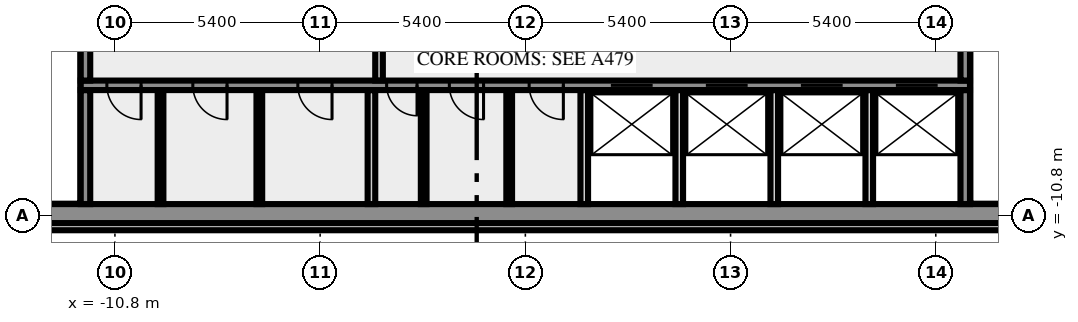
"""IFC4 building model, lengths in metres.
Left out: names, types, materials, properties, quantities, classifications, styles, units other than length and angle.
Written with IfcOpenShell. Run it as: python <this file> out.ifc"""

import sys

from ifc_helpers import new_model, si_unit, direction, frame, frame_2d, origin, place, context, subcontext, project, spatial, rectangle, extrude, element, fill, save


model = new_model("IFC4")
c1 = context("Model", 3, precision=1e-05, world=origin(), true_north=direction((0.0, 1.0)))
c2 = subcontext(c1, "Body", "Model", "MODEL_VIEW")
j1 = project(units=[si_unit("LENGTHUNIT", "METRE"), si_unit("PLANEANGLEUNIT", "RADIAN")], contexts=[c1])
p1 = place(None, origin())
s1 = spatial("IfcSite", under=j1, at=p1, CompositionType="ELEMENT")
p2 = place(p1, origin())
s2 = spatial("IfcBuilding", under=s1, at=p2, CompositionType="ELEMENT")
p3 = place(p2, frame((0.0, 0.0, 148.0)))
s3 = spatial("IfcBuildingStorey", under=s2, at=p3, CompositionType="ELEMENT", Elevation=148.0)
p4 = place(p3, frame((-17.444, -11.088, 0.0), z_axis=(0.0, 0.0, 1.0), x_axis=(1.0, 0.0, 0.0)))
e1 = element("IfcWall", 1, at=p4, inside=s3, PredefinedType="SOLIDWALL", context=c2, shape_type="SweptSolid", body=[
    extrude(rectangle(XDim=34.888, YDim=0.2, at=frame_2d((17.444, 0.0))), origin(), (0.0, 0.0, 1.0), 3.65),
])
p5 = place(p3, frame((-20.0, -10.75, 0.0), z_axis=(0.0, 0.0, 1.0), x_axis=(1.0, 0.0, 0.0)))
e2 = element("IfcWall", 2, at=p5, inside=s3, PredefinedType="SHEAR", context=c2, shape_type="SweptSolid", body=[
    extrude(rectangle(XDim=40.0, YDim=0.5, at=frame_2d((20.0, 0.0))), origin(), (0.0, 0.0, 1.0), 3.65),
])
p6 = place(p5, frame((0.8, 0.0, 1.0)))
e3 = element("IfcOpeningElement", 3, at=p6, cuts=e2, PredefinedType="OPENING", context=c2, shape_type="SweptSolid", body=[
    extrude(rectangle(XDim=1.2, YDim=1.2, at=frame_2d((0.6, 0.6))), frame((0.0, 0.26, 0.0), z_axis=(0.0, -1.0, 0.0), x_axis=(1.0, 0.0, 0.0)), (0.0, 0.0, 1.0), 0.52),
])
p7 = place(p5, frame((38.0, 0.0, 1.0)))
e4 = element("IfcOpeningElement", 4, at=p7, cuts=e2, PredefinedType="OPENING", context=c2, shape_type="SweptSolid", body=[
    extrude(rectangle(XDim=1.2, YDim=1.2, at=frame_2d((0.6, 0.6))), frame((0.0, 0.26, 0.0), z_axis=(0.0, -1.0, 0.0), x_axis=(1.0, 0.0, 0.0)), (0.0, 0.0, 1.0), 0.52),
])
p8 = place(p3, frame((-11.575, -10.5, 0.0), z_axis=(0.0, 0.0, 1.0), x_axis=(0.0, 1.0, 0.0)))
e5 = element("IfcWall", 5, at=p8, inside=s3, PredefinedType="SHEAR", context=c2, shape_type="SweptSolid", body=[
    extrude(rectangle(XDim=3.0, YDim=0.25, at=frame_2d((1.5, 0.0))), origin(), (0.0, 0.0, 1.0), 3.65),
])
for number, where, z_axis, x_axis in (
    (6, (-9.6, -10.5, 0.0), (0.0, 0.0, 1.0), (0.0, 1.0, 0.0)),
    (7, (-7.0, -10.5, 0.0), (0.0, 0.0, 1.0), (0.0, 1.0, 0.0)),
):
    element("IfcWall", number, at=place(p3, frame(where, z_axis=z_axis, x_axis=x_axis)), inside=s3, PredefinedType="PARTITIONING", context=c2, shape_type="SweptSolid", body=[
        extrude(rectangle(XDim=3.0, YDim=0.15, at=frame_2d((1.5, 0.0))), origin(), (0.0, 0.0, 1.0), 3.65),
    ])
p9 = place(p3, frame((-4.05, -10.5, 0.0), z_axis=(0.0, 0.0, 1.0), x_axis=(0.0, 1.0, 0.0)))
e8 = element("IfcWall", 8, at=p9, inside=s3, PredefinedType="SOLIDWALL", context=c2, shape_type="SweptSolid", body=[
    extrude(rectangle(XDim=3.0, YDim=0.2, at=frame_2d((1.5, 0.0))), origin(), (0.0, 0.0, 1.0), 3.65),
])
for number, where, z_axis, x_axis in (
    (9, (-2.675, -10.5, 0.0), (0.0, 0.0, 1.0), (0.0, 1.0, 0.0)),
    (10, (-0.425, -10.5, 0.0), (0.0, 0.0, 1.0), (0.0, 1.0, 0.0)),
):
    element("IfcWall", number, at=place(p3, frame(where, z_axis=z_axis, x_axis=x_axis)), inside=s3, PredefinedType="PARTITIONING", context=c2, shape_type="SweptSolid", body=[
        extrude(rectangle(XDim=3.0, YDim=0.15, at=frame_2d((1.5, 0.0))), origin(), (0.0, 0.0, 1.0), 3.65),
    ])
for number, where, z_axis, x_axis in (
    (11, (1.55, -10.5, 0.0), (0.0, 0.0, 1.0), (0.0, 1.0, 0.0)),
    (12, (4.05, -10.5, 0.0), (0.0, 0.0, 1.0), (0.0, 1.0, 0.0)),
    (13, (6.55, -10.5, 0.0), (0.0, 0.0, 1.0), (0.0, 1.0, 0.0)),
    (14, (9.05, -10.5, 0.0), (0.0, 0.0, 1.0), (0.0, 1.0, 0.0)),
):
    element("IfcWall", number, at=place(p3, frame(where, z_axis=z_axis, x_axis=x_axis)), inside=s3, PredefinedType="SOLIDWALL", context=c2, shape_type="SweptSolid", body=[
        extrude(rectangle(XDim=3.0, YDim=0.2, at=frame_2d((1.5, 0.0))), origin(), (0.0, 0.0, 1.0), 3.65),
    ])
p10 = place(p3, frame((11.575, -10.5, 0.0), z_axis=(0.0, 0.0, 1.0), x_axis=(0.0, 1.0, 0.0)))
e15 = element("IfcWall", 15, at=p10, inside=s3, PredefinedType="SHEAR", context=c2, shape_type="SweptSolid", body=[
    extrude(rectangle(XDim=3.0, YDim=0.25, at=frame_2d((1.5, 0.0))), origin(), (0.0, 0.0, 1.0), 3.65),
])
p11 = place(p3, frame((11.7, -7.375, 0.0), z_axis=(0.0, 0.0, 1.0), x_axis=(-1.0, 0.0, 0.0)))
e16 = element("IfcWall", 16, at=p11, inside=s3, PredefinedType="SHEAR", context=c2, shape_type="SweptSolid", body=[
    extrude(rectangle(XDim=23.4, YDim=0.25, at=frame_2d((11.7, 0.0))), origin(), (0.0, 0.0, 1.0), 3.65),
])
p12 = place(p11, frame((21.812, 0.0, 0.0)))
e17 = element("IfcOpeningElement", 17, at=p12, cuts=e16, PredefinedType="OPENING", context=c2, shape_type="SweptSolid", body=[
    extrude(rectangle(XDim=0.9, YDim=2.1, at=frame_2d((0.45, 1.05))), frame((0.0, 0.135, 0.0), z_axis=(0.0, -1.0, 0.0), x_axis=(1.0, 0.0, 0.0)), (0.0, 0.0, 1.0), 0.27),
])
p13 = place(p11, frame((19.55, 0.0, 0.0)))
e18 = element("IfcOpeningElement", 18, at=p13, cuts=e16, PredefinedType="OPENING", context=c2, shape_type="SweptSolid", body=[
    extrude(rectangle(XDim=0.9, YDim=2.1, at=frame_2d((0.45, 1.05))), frame((0.0, 0.135, 0.0), z_axis=(0.0, -1.0, 0.0), x_axis=(1.0, 0.0, 0.0)), (0.0, 0.0, 1.0), 0.27),
])
p14 = place(p11, frame((16.787, 0.0, 0.0)))
e19 = element("IfcOpeningElement", 19, at=p14, cuts=e16, PredefinedType="OPENING", context=c2, shape_type="SweptSolid", body=[
    extrude(rectangle(XDim=0.9, YDim=2.1, at=frame_2d((0.45, 1.05))), frame((0.0, 0.135, 0.0), z_axis=(0.0, -1.0, 0.0), x_axis=(1.0, 0.0, 0.0)), (0.0, 0.0, 1.0), 0.27),
])
p15 = place(p11, frame((14.55, 0.0, 0.0)))
e20 = element("IfcOpeningElement", 20, at=p15, cuts=e16, PredefinedType="OPENING", context=c2, shape_type="SweptSolid", body=[
    extrude(rectangle(XDim=0.8, YDim=2.1, at=frame_2d((0.4, 1.05))), frame((0.0, 0.135, 0.0), z_axis=(0.0, -1.0, 0.0), x_axis=(1.0, 0.0, 0.0)), (0.0, 0.0, 1.0), 0.27),
])
p16 = place(p11, frame((12.8, 0.0, 0.0)))
e21 = element("IfcOpeningElement", 21, at=p16, cuts=e16, PredefinedType="OPENING", context=c2, shape_type="SweptSolid", body=[
    extrude(rectangle(XDim=0.9, YDim=2.1, at=frame_2d((0.45, 1.05))), frame((0.0, 0.135, 0.0), z_axis=(0.0, -1.0, 0.0), x_axis=(1.0, 0.0, 0.0)), (0.0, 0.0, 1.0), 0.27),
])
p17 = place(p11, frame((10.7, 0.0, 0.0)))
e22 = element("IfcOpeningElement", 22, at=p17, cuts=e16, PredefinedType="OPENING", context=c2, shape_type="SweptSolid", body=[
    extrude(rectangle(XDim=0.9, YDim=2.1, at=frame_2d((0.45, 1.05))), frame((0.0, 0.135, 0.0), z_axis=(0.0, -1.0, 0.0), x_axis=(1.0, 0.0, 0.0)), (0.0, 0.0, 1.0), 0.27),
])
p18 = place(p11, frame((8.35, 0.0, 0.0)))
e23 = element("IfcOpeningElement", 23, at=p18, cuts=e16, PredefinedType="OPENING", context=c2, shape_type="SweptSolid", body=[
    extrude(rectangle(XDim=1.1, YDim=2.1, at=frame_2d((0.55, 1.05))), frame((0.0, 0.135, 0.0), z_axis=(0.0, -1.0, 0.0), x_axis=(1.0, 0.0, 0.0)), (0.0, 0.0, 1.0), 0.27),
])
p19 = place(p11, frame((5.85, 0.0, 0.0)))
e24 = element("IfcOpeningElement", 24, at=p19, cuts=e16, PredefinedType="OPENING", context=c2, shape_type="SweptSolid", body=[
    extrude(rectangle(XDim=1.1, YDim=2.1, at=frame_2d((0.55, 1.05))), frame((0.0, 0.135, 0.0), z_axis=(0.0, -1.0, 0.0), x_axis=(1.0, 0.0, 0.0)), (0.0, 0.0, 1.0), 0.27),
])
p20 = place(p11, frame((3.35, 0.0, 0.0)))
e25 = element("IfcOpeningElement", 25, at=p20, cuts=e16, PredefinedType="OPENING", context=c2, shape_type="SweptSolid", body=[
    extrude(rectangle(XDim=1.1, YDim=2.1, at=frame_2d((0.55, 1.05))), frame((0.0, 0.135, 0.0), z_axis=(0.0, -1.0, 0.0), x_axis=(1.0, 0.0, 0.0)), (0.0, 0.0, 1.0), 0.27),
])
p21 = place(p11, frame((0.85, 0.0, 0.0)))
e26 = element("IfcOpeningElement", 26, at=p21, cuts=e16, PredefinedType="OPENING", context=c2, shape_type="SweptSolid", body=[
    extrude(rectangle(XDim=1.1, YDim=2.1, at=frame_2d((0.55, 1.05))), frame((0.0, 0.135, 0.0), z_axis=(0.0, -1.0, 0.0), x_axis=(1.0, 0.0, 0.0)), (0.0, 0.0, 1.0), 0.27),
])
p22 = place(p3, frame((-11.575, -7.25, 0.0), z_axis=(0.0, 0.0, 1.0), x_axis=(0.0, 1.0, 0.0)))
e27 = element("IfcWall", 27, at=p22, inside=s3, PredefinedType="SHEAR", context=c2, shape_type="SweptSolid", body=[
    extrude(rectangle(XDim=1.0, YDim=0.25, at=frame_2d((0.5, 0.0))), origin(), (0.0, 0.0, 1.0), 3.65),
])
p23 = place(p3, frame((-3.85, -4.25, 0.0), z_axis=(0.0, 0.0, 1.0), x_axis=(0.0, -1.0, 0.0)))
e28 = element("IfcWall", 28, at=p23, inside=s3, PredefinedType="SOLIDWALL", context=c2, shape_type="SweptSolid", body=[
    extrude(rectangle(XDim=3.0, YDim=0.2, at=frame_2d((1.5, 0.0))), origin(), (0.0, 0.0, 1.0), 3.65),
])
p24 = place(p23, frame((0.8, 0.0, 0.0)))
e29 = element("IfcOpeningElement", 29, at=p24, cuts=e28, PredefinedType="OPENING", context=c2, shape_type="SweptSolid", body=[
    extrude(rectangle(XDim=1.4, YDim=2.1, at=frame_2d((0.7, 1.05))), frame((0.0, 0.11, 0.0), z_axis=(0.0, -1.0, 0.0), x_axis=(1.0, 0.0, 0.0)), (0.0, 0.0, 1.0), 0.22),
])
p25 = place(p3, frame((11.575, -7.25, 0.0), z_axis=(0.0, 0.0, 1.0), x_axis=(0.0, 1.0, 0.0)))
e30 = element("IfcWall", 30, at=p25, inside=s3, PredefinedType="SHEAR", context=c2, shape_type="SweptSolid", body=[
    extrude(rectangle(XDim=1.0, YDim=0.25, at=frame_2d((0.5, 0.0))), origin(), (0.0, 0.0, 1.0), 3.65),
])
p26 = place(p12, origin())
e31 = element("IfcDoor", 31, at=p26, inside=s3, OperationType="SINGLE_SWING_RIGHT", PredefinedType="DOOR", context=c2, shape_type="SweptSolid", body=[
    extrude(rectangle(XDim=0.9, YDim=2.1, at=frame_2d((0.45, 1.05))), frame((0.0, 0.025, 0.0), z_axis=(0.0, -1.0, 0.0), x_axis=(1.0, 0.0, 0.0)), (0.0, 0.0, 1.0), 0.05),
])
fill(e17, e31)
p27 = place(p13, origin())
e32 = element("IfcDoor", 32, at=p27, inside=s3, OperationType="SINGLE_SWING_RIGHT", PredefinedType="DOOR", context=c2, shape_type="SweptSolid", body=[
    extrude(rectangle(XDim=0.9, YDim=2.1, at=frame_2d((0.45, 1.05))), frame((0.0, 0.025, 0.0), z_axis=(0.0, -1.0, 0.0), x_axis=(1.0, 0.0, 0.0)), (0.0, 0.0, 1.0), 0.05),
])
fill(e18, e32)
p28 = place(p14, origin())
e33 = element("IfcDoor", 33, at=p28, inside=s3, OperationType="SINGLE_SWING_RIGHT", PredefinedType="DOOR", context=c2, shape_type="SweptSolid", body=[
    extrude(rectangle(XDim=0.9, YDim=2.1, at=frame_2d((0.45, 1.05))), frame((0.0, 0.025, 0.0), z_axis=(0.0, -1.0, 0.0), x_axis=(1.0, 0.0, 0.0)), (0.0, 0.0, 1.0), 0.05),
])
fill(e19, e33)
p29 = place(p15, origin())
e34 = element("IfcDoor", 34, at=p29, inside=s3, OperationType="SINGLE_SWING_RIGHT", PredefinedType="DOOR", context=c2, shape_type="SweptSolid", body=[
    extrude(rectangle(XDim=0.8, YDim=2.1, at=frame_2d((0.4, 1.05))), frame((0.0, 0.025, 0.0), z_axis=(0.0, -1.0, 0.0), x_axis=(1.0, 0.0, 0.0)), (0.0, 0.0, 1.0), 0.05),
])
fill(e20, e34)
p30 = place(p16, origin())
e35 = element("IfcDoor", 35, at=p30, inside=s3, OperationType="SINGLE_SWING_RIGHT", PredefinedType="DOOR", context=c2, shape_type="SweptSolid", body=[
    extrude(rectangle(XDim=0.9, YDim=2.1, at=frame_2d((0.45, 1.05))), frame((0.0, 0.025, 0.0), z_axis=(0.0, -1.0, 0.0), x_axis=(1.0, 0.0, 0.0)), (0.0, 0.0, 1.0), 0.05),
])
fill(e21, e35)
p31 = place(p17, origin())
e36 = element("IfcDoor", 36, at=p31, inside=s3, OperationType="SINGLE_SWING_LEFT", PredefinedType="DOOR", context=c2, shape_type="SweptSolid", body=[
    extrude(rectangle(XDim=0.9, YDim=2.1, at=frame_2d((0.45, 1.05))), frame((0.0, 0.025, 0.0), z_axis=(0.0, -1.0, 0.0), x_axis=(1.0, 0.0, 0.0)), (0.0, 0.0, 1.0), 0.05),
])
fill(e22, e36)
p32 = place(p18, origin())
e37 = element("IfcDoor", 37, at=p32, inside=s3, OperationType="DOUBLE_DOOR_SLIDING", PredefinedType="DOOR", context=c2, shape_type="SweptSolid", body=[
    extrude(rectangle(XDim=1.1, YDim=2.1, at=frame_2d((0.55, 1.05))), frame((0.0, 0.025, 0.0), z_axis=(0.0, -1.0, 0.0), x_axis=(1.0, 0.0, 0.0)), (0.0, 0.0, 1.0), 0.05),
])
fill(e23, e37)
p33 = place(p19, origin())
e38 = element("IfcDoor", 38, at=p33, inside=s3, OperationType="DOUBLE_DOOR_SLIDING", PredefinedType="DOOR", context=c2, shape_type="SweptSolid", body=[
    extrude(rectangle(XDim=1.1, YDim=2.1, at=frame_2d((0.55, 1.05))), frame((0.0, 0.025, 0.0), z_axis=(0.0, -1.0, 0.0), x_axis=(1.0, 0.0, 0.0)), (0.0, 0.0, 1.0), 0.05),
])
fill(e24, e38)
p34 = place(p20, origin())
e39 = element("IfcDoor", 39, at=p34, inside=s3, OperationType="DOUBLE_DOOR_SLIDING", PredefinedType="DOOR", context=c2, shape_type="SweptSolid", body=[
    extrude(rectangle(XDim=1.1, YDim=2.1, at=frame_2d((0.55, 1.05))), frame((0.0, 0.025, 0.0), z_axis=(0.0, -1.0, 0.0), x_axis=(1.0, 0.0, 0.0)), (0.0, 0.0, 1.0), 0.05),
])
fill(e25, e39)
p35 = place(p21, origin())
e40 = element("IfcDoor", 40, at=p35, inside=s3, OperationType="DOUBLE_DOOR_SLIDING", PredefinedType="DOOR", context=c2, shape_type="SweptSolid", body=[
    extrude(rectangle(XDim=1.1, YDim=2.1, at=frame_2d((0.55, 1.05))), frame((0.0, 0.025, 0.0), z_axis=(0.0, -1.0, 0.0), x_axis=(1.0, 0.0, 0.0)), (0.0, 0.0, 1.0), 0.05),
])
fill(e26, e40)
save(model, sys.argv[1])
